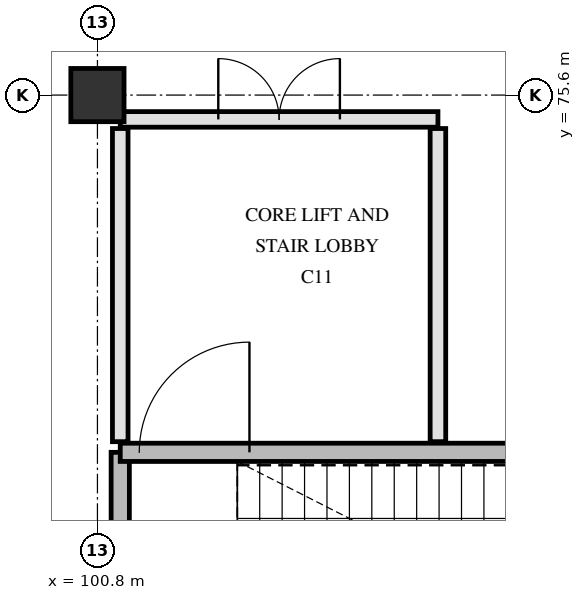
"""IFC4 building model, lengths in metres.
Left out: names, types, materials, properties, quantities, classifications, styles, units other than length and angle.
Written with IfcOpenShell. Run it as: python <this file> out.ifc"""

import sys

from ifc_helpers import new_model, si_unit, direction, frame, frame_2d, origin, origin_2d, place, context, subcontext, project, spatial, rectangle, extrude, element, fill, save


model = new_model("IFC4")
c1 = context("Model", 3, precision=1e-05, world=origin(), true_north=direction((0.0, 1.0)))
c2 = subcontext(c1, "Body", "Model", "MODEL_VIEW")
j1 = project(units=[si_unit("LENGTHUNIT", "METRE"), si_unit("PLANEANGLEUNIT", "RADIAN")], contexts=[c1])
p1 = place(None, origin())
s1 = spatial("IfcSite", under=j1, at=p1, CompositionType="ELEMENT")
p2 = place(p1, origin())
s2 = spatial("IfcBuilding", under=s1, at=p2, CompositionType="ELEMENT")
p3 = place(p2, frame((0.0, 0.0, 9.3)))
s3 = spatial("IfcBuildingStorey", under=s2, at=p3, CompositionType="ELEMENT", Elevation=9.3)
p4 = place(p3, frame((100.8, 75.6, 0.0), z_axis=(0.0, 0.0, 1.0), x_axis=(1.0, 0.0, 0.0)))
e1 = element("IfcColumn", 1, at=p4, inside=s3, PredefinedType="COLUMN", context=c2, shape_type="SweptSolid", body=[
    extrude(rectangle(XDim=0.7, YDim=0.7, at=origin_2d()), origin(), (0.0, 0.0, 1.0), 5.1),
])
p5 = place(p3, frame((101.1, 67.58, 0.0), z_axis=(0.0, 0.0, 1.0), x_axis=(0.0, 1.0, 0.0)))
e2 = element("IfcWall", 2, at=p5, inside=s3, PredefinedType="SHEAR", context=c2, shape_type="SweptSolid", body=[
    extrude(rectangle(XDim=3.32, YDim=0.24, at=frame_2d((1.66, 0.0))), origin(), (0.0, 0.0, 1.0), 4.78),
])
p6 = place(p3, frame((101.1, 70.9, 0.0), z_axis=(0.0, 0.0, 1.0), x_axis=(1.0, 0.0, 0.0)))
e3 = element("IfcWall", 3, at=p6, inside=s3, PredefinedType="SHEAR", context=c2, shape_type="SweptSolid", body=[
    extrude(rectangle(XDim=7.82, YDim=0.24, at=frame_2d((3.91, 0.0))), origin(), (0.0, 0.0, 1.0), 4.78),
])
p7 = place(p6, frame((0.25, 0.0, 0.0)))
e4 = element("IfcOpeningElement", 4, at=p7, cuts=e3, PredefinedType="OPENING", context=c2, shape_type="SweptSolid", body=[
    extrude(rectangle(XDim=1.45, YDim=2.2, at=frame_2d((0.725, 1.1))), frame((0.0, 0.13, 0.0), z_axis=(0.0, -1.0, 0.0), x_axis=(1.0, 0.0, 0.0)), (0.0, 0.0, 1.0), 0.26),
])
p8 = place(p3, frame((105.28, 71.04, 0.0), z_axis=(0.0, 0.0, 1.0), x_axis=(0.0, 1.0, 0.0)))
e5 = element("IfcWall", 5, at=p8, inside=s3, PredefinedType="PARTITIONING", context=c2, shape_type="SweptSolid", body=[
    extrude(rectangle(XDim=4.12, YDim=0.205, at=frame_2d((2.06, 0.0))), origin(), (0.0, 0.0, 1.0), 4.77),
])
p9 = place(p3, frame((101.1, 71.04, 0.0), z_axis=(0.0, 0.0, 1.0), x_axis=(0.0, 1.0, 0.0)))
e6 = element("IfcWall", 6, at=p9, inside=s3, PredefinedType="PARTITIONING", context=c2, shape_type="SweptSolid", body=[
    extrude(rectangle(XDim=4.12, YDim=0.205, at=frame_2d((2.06, 0.0))), origin(), (0.0, 0.0, 1.0), 4.17),
])
p10 = place(p3, frame((101.1, 75.28, 0.0), z_axis=(0.0, 0.0, 1.0), x_axis=(1.0, 0.0, 0.0)))
e7 = element("IfcWall", 7, at=p10, inside=s3, PredefinedType="PARTITIONING", context=c2, shape_type="SweptSolid", body=[
    extrude(rectangle(XDim=4.18, YDim=0.205, at=frame_2d((2.09, 0.0))), origin(), (0.0, 0.0, 1.0), 4.17),
])
p11 = place(p10, frame((1.29, 0.0, 0.0)))
e8 = element("IfcOpeningElement", 8, at=p11, cuts=e7, PredefinedType="OPENING", context=c2, shape_type="SweptSolid", body=[
    extrude(rectangle(XDim=1.6, YDim=2.25, at=frame_2d((0.8, 1.125))), frame((0.0, 0.113, 0.0), z_axis=(0.0, -1.0, 0.0), x_axis=(1.0, 0.0, 0.0)), (0.0, 0.0, 1.0), 0.225),
])
p12 = place(p7, origin())
e9 = element("IfcDoor", 9, at=p12, inside=s3, OperationType="SINGLE_SWING_RIGHT", PredefinedType="DOOR", context=c2, shape_type="SweptSolid", body=[
    extrude(rectangle(XDim=1.45, YDim=2.2, at=frame_2d((0.725, 1.1))), frame((0.0, 0.025, 0.0), z_axis=(0.0, -1.0, 0.0), x_axis=(1.0, 0.0, 0.0)), (0.0, 0.0, 1.0), 0.05),
])
fill(e4, e9)
p13 = place(p11, origin())
e10 = element("IfcDoor", 10, at=p13, inside=s3, OperationType="DOUBLE_SWING_LEFT", PredefinedType="DOOR", context=c2, shape_type="SweptSolid", body=[
    extrude(rectangle(XDim=1.6, YDim=2.25, at=frame_2d((0.8, 1.125))), frame((0.0, 0.025, 0.0), z_axis=(0.0, -1.0, 0.0), x_axis=(1.0, 0.0, 0.0)), (0.0, 0.0, 1.0), 0.05),
])
fill(e8, e10)
save(model, sys.argv[1])
